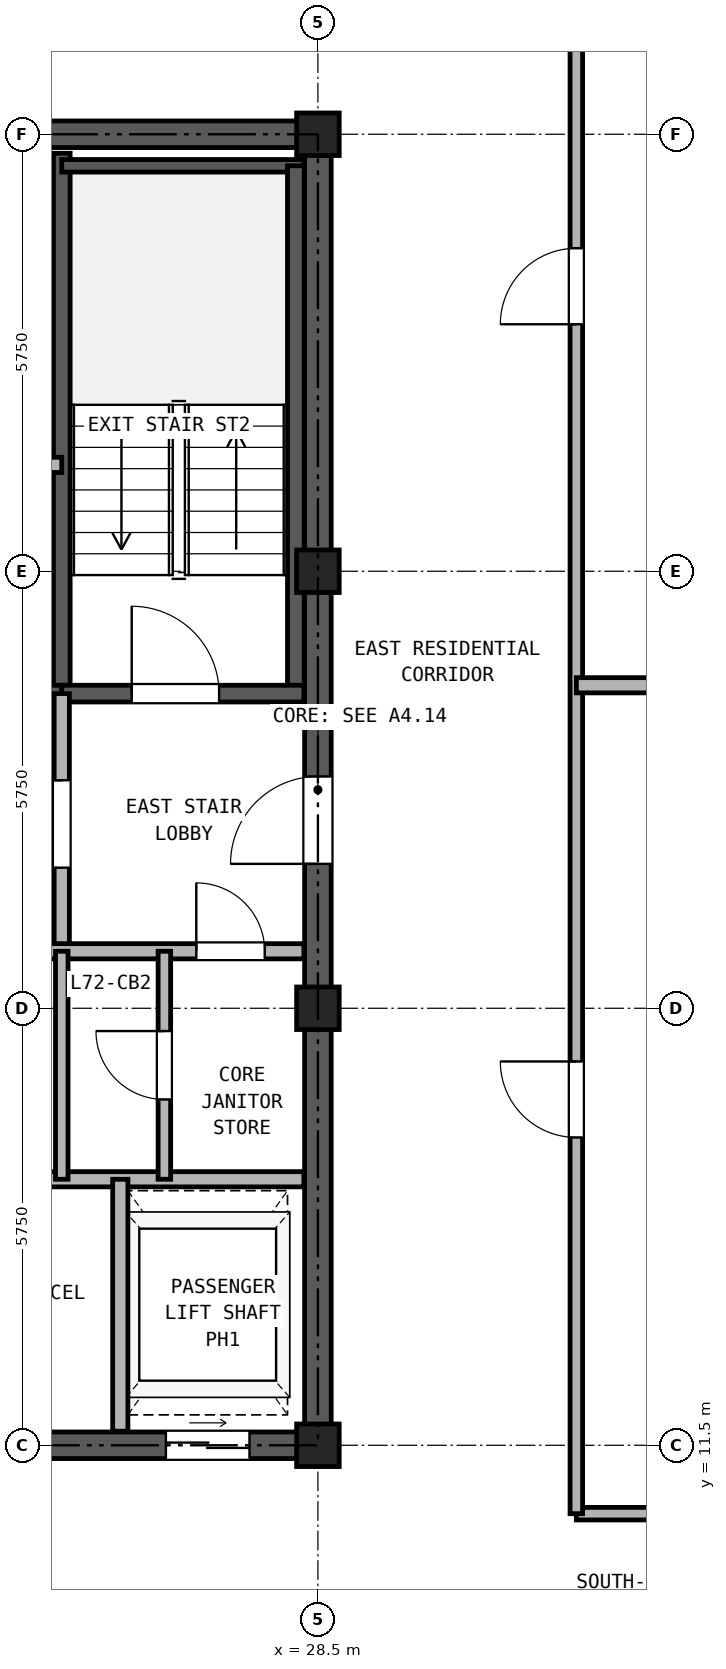
"""IFC4 building model, lengths in metres.
Left out: names, types, materials, properties, quantities, classifications, styles, units other than length and angle.
Written with IfcOpenShell. Run it as: python <this file> out.ifc"""

import sys

from ifc_helpers import new_model, si_unit, direction, frame, frame_2d, origin, origin_2d, place, context, subcontext, project, spatial, rectangle, hollow_rectangle, extrude, source, transform, mapped, element, fill, save


model = new_model("IFC4")
c1 = context("Model", 3, precision=1e-05, world=origin(), true_north=direction((0.0, 1.0)))
c2 = subcontext(c1, "Body", "Model", "MODEL_VIEW")
j1 = project(units=[si_unit("LENGTHUNIT", "METRE"), si_unit("PLANEANGLEUNIT", "RADIAN")], contexts=[c1])
p1 = place(None, origin())
s1 = spatial("IfcSite", under=j1, at=p1, CompositionType="ELEMENT")
p2 = place(p1, origin())
s2 = spatial("IfcBuilding", under=s1, at=p2, CompositionType="ELEMENT")
p3 = place(p2, frame((0.0, 0.0, 252.1)))
s3 = spatial("IfcBuildingStorey", under=s2, at=p3, CompositionType="ELEMENT", Elevation=252.1)
m1 = source(origin(), c2, "Body", "SweptSolid", [
    extrude(hollow_rectangle(XDim=0.56, YDim=0.56, WallThickness=0.03, at=origin_2d()), origin(), (0.0, 0.0, 1.0), 2.98),
])
for number, where, z_axis, x_axis in (
    (1, (28.5, 11.5, 0.0), (0.0, 0.0, 1.0), (1.0, 0.0, 0.0)),
    (2, (28.5, 17.25, 0.0), (0.0, 0.0, 1.0), (1.0, 0.0, 0.0)),
    (3, (28.5, 23.0, 0.0), (0.0, 0.0, 1.0), (1.0, 0.0, 0.0)),
    (4, (28.5, 28.75, 0.0), (0.0, 0.0, 1.0), (1.0, 0.0, 0.0)),
):
    element("IfcColumn", number, at=place(p3, frame(where, z_axis=z_axis, x_axis=x_axis)), inside=s3, PredefinedType="COLUMN", context=c2, shape_type="MappedRepresentation", body=[
        mapped(m1, transform((0.0, 0.0, 0.0), x_axis=(1.0, 0.0, 0.0), y_axis=(0.0, 1.0, 0.0), z_axis=(0.0, 0.0, 1.0), scale=1.0)),
    ])
p4 = place(p3, frame((18.325, 11.5, 0.0), z_axis=(0.0, 0.0, 1.0), x_axis=(1.0, 0.0, 0.0)))
e5 = element("IfcWall", 5, at=p4, inside=s3, PredefinedType="SHEAR", context=c2, shape_type="SweptSolid", body=[
    extrude(rectangle(XDim=10.35, YDim=0.35, at=frame_2d((5.175, 0.0))), origin(), (0.0, 0.0, 1.0), 2.98),
])
p5 = place(p4, frame((1.775, 0.0, 0.0)))
e6 = element("IfcOpeningElement", 6, at=p5, cuts=e5, PredefinedType="OPENING", context=c2, shape_type="SweptSolid", body=[
    extrude(rectangle(XDim=0.95, YDim=2.15, at=frame_2d((0.475, 1.075))), frame((0.0, 0.185, 0.0), z_axis=(0.0, -1.0, 0.0), x_axis=(1.0, 0.0, 0.0)), (0.0, 0.0, 1.0), 0.37),
])
p6 = place(p4, frame((5.275, 0.0, 0.0)))
e7 = element("IfcOpeningElement", 7, at=p6, cuts=e5, PredefinedType="OPENING", context=c2, shape_type="SweptSolid", body=[
    extrude(rectangle(XDim=0.95, YDim=2.15, at=frame_2d((0.475, 1.075))), frame((0.0, 0.185, 0.0), z_axis=(0.0, -1.0, 0.0), x_axis=(1.0, 0.0, 0.0)), (0.0, 0.0, 1.0), 0.37),
])
p7 = place(p4, frame((8.175, 0.0, 0.0)))
e8 = element("IfcOpeningElement", 8, at=p7, cuts=e5, PredefinedType="OPENING", context=c2, shape_type="SweptSolid", body=[
    extrude(rectangle(XDim=1.1, YDim=2.25, at=frame_2d((0.55, 1.125))), frame((0.0, 0.185, 0.0), z_axis=(0.0, -1.0, 0.0), x_axis=(1.0, 0.0, 0.0)), (0.0, 0.0, 1.0), 0.37),
])
p8 = place(p3, frame((18.325, 28.75, 0.0), z_axis=(0.0, 0.0, 1.0), x_axis=(1.0, 0.0, 0.0)))
e9 = element("IfcWall", 9, at=p8, inside=s3, PredefinedType="SHEAR", context=c2, shape_type="SweptSolid", body=[
    extrude(rectangle(XDim=10.35, YDim=0.35, at=frame_2d((5.175, 0.0))), origin(), (0.0, 0.0, 1.0), 2.98),
])
p9 = place(p8, frame((4.055, 0.0, 0.0)))
e10 = element("IfcOpeningElement", 10, at=p9, cuts=e9, PredefinedType="OPENING", context=c2, shape_type="SweptSolid", body=[
    extrude(rectangle(XDim=0.9, YDim=2.05, at=frame_2d((0.45, 1.025))), frame((0.0, 0.185, 0.0), z_axis=(0.0, -1.0, 0.0), x_axis=(1.0, 0.0, 0.0)), (0.0, 0.0, 1.0), 0.37),
])
p10 = place(p8, frame((5.595, 0.0, 0.0)))
e11 = element("IfcOpeningElement", 11, at=p10, cuts=e9, PredefinedType="OPENING", context=c2, shape_type="SweptSolid", body=[
    extrude(rectangle(XDim=0.9, YDim=2.05, at=frame_2d((0.45, 1.025))), frame((0.0, 0.185, 0.0), z_axis=(0.0, -1.0, 0.0), x_axis=(1.0, 0.0, 0.0)), (0.0, 0.0, 1.0), 0.37),
])
p11 = place(p3, frame((28.5, 11.675, 0.0), z_axis=(0.0, 0.0, 1.0), x_axis=(0.0, 1.0, 0.0)))
e12 = element("IfcWall", 12, at=p11, inside=s3, PredefinedType="SHEAR", context=c2, shape_type="SweptSolid", body=[
    extrude(rectangle(XDim=16.9, YDim=0.35, at=frame_2d((8.45, 0.0))), origin(), (0.0, 0.0, 1.0), 2.98),
])
p12 = place(p11, frame((7.475, 0.0, 0.0)))
e13 = element("IfcOpeningElement", 13, at=p12, cuts=e12, PredefinedType="OPENING", context=c2, shape_type="SweptSolid", body=[
    extrude(rectangle(XDim=1.15, YDim=2.2, at=frame_2d((0.575, 1.1))), frame((0.0, 0.185, 0.0), z_axis=(0.0, -1.0, 0.0), x_axis=(1.0, 0.0, 0.0)), (0.0, 0.0, 1.0), 0.37),
])
p13 = place(p3, frame((25.13, 21.39, 0.0), z_axis=(0.0, 0.0, 1.0), x_axis=(0.0, 1.0, 0.0)))
e14 = element("IfcWall", 14, at=p13, inside=s3, PredefinedType="SOLIDWALL", context=c2, shape_type="SweptSolid", body=[
    extrude(rectangle(XDim=7.11, YDim=0.22, at=frame_2d((3.555, 0.0))), origin(), (0.0, 0.0, 1.0), 2.98),
])
p14 = place(p3, frame((25.13, 28.335, 0.0), z_axis=(0.0, 0.0, 1.0), x_axis=(1.0, 0.0, 0.0)))
e15 = element("IfcWall", 15, at=p14, inside=s3, PredefinedType="PARTITIONING", context=c2, shape_type="SweptSolid", body=[
    extrude(rectangle(XDim=3.185, YDim=0.165, at=frame_2d((1.593, 0.0))), origin(), (0.0, 0.0, 1.0), 2.98),
])
p15 = place(p3, frame((28.21, 21.39, 0.0), z_axis=(0.0, 0.0, 1.0), x_axis=(0.0, 1.0, 0.0)))
e16 = element("IfcWall", 16, at=p15, inside=s3, PredefinedType="SOLIDWALL", context=c2, shape_type="SweptSolid", body=[
    extrude(rectangle(XDim=6.945, YDim=0.22, at=frame_2d((3.473, 0.0))), origin(), (0.0, 0.0, 1.0), 2.98),
])
p16 = place(p3, frame((18.685, 21.39, 0.0), z_axis=(0.0, 0.0, 1.0), x_axis=(1.0, 0.0, 0.0)))
e17 = element("IfcWall", 17, at=p16, inside=s3, PredefinedType="SOLIDWALL", context=c2, shape_type="SweptSolid", body=[
    extrude(rectangle(XDim=6.445, YDim=0.22, at=frame_2d((3.222, 0.0))), origin(), (0.0, 0.0, 1.0), 2.98),
])
p17 = place(p16, frame((1.165, 0.0, 0.0)))
e18 = element("IfcOpeningElement", 18, at=p17, cuts=e17, PredefinedType="OPENING", context=c2, shape_type="SweptSolid", body=[
    extrude(rectangle(XDim=1.15, YDim=2.2, at=frame_2d((0.575, 1.1))), frame((0.0, 0.12, 0.0), z_axis=(0.0, -1.0, 0.0), x_axis=(1.0, 0.0, 0.0)), (0.0, 0.0, 1.0), 0.24),
])
p18 = place(p16, frame((4.895, 0.0, 0.0)))
e19 = element("IfcOpeningElement", 19, at=p18, cuts=e17, PredefinedType="OPENING", context=c2, shape_type="SweptSolid", body=[
    extrude(rectangle(XDim=1.1, YDim=2.25, at=frame_2d((0.55, 1.125))), frame((0.0, 0.12, 0.0), z_axis=(0.0, -1.0, 0.0), x_axis=(1.0, 0.0, 0.0)), (0.0, 0.0, 1.0), 0.24),
])
p19 = place(p3, frame((25.13, 21.39, 0.0), z_axis=(0.0, 0.0, 1.0), x_axis=(1.0, 0.0, 0.0)))
e20 = element("IfcWall", 20, at=p19, inside=s3, PredefinedType="SOLIDWALL", context=c2, shape_type="SweptSolid", body=[
    extrude(rectangle(XDim=3.185, YDim=0.22, at=frame_2d((1.593, 0.0))), origin(), (0.0, 0.0, 1.0), 2.98),
])
p20 = place(p19, frame((0.92, 0.0, 0.0)))
e21 = element("IfcOpeningElement", 21, at=p20, cuts=e20, PredefinedType="OPENING", context=c2, shape_type="SweptSolid", body=[
    extrude(rectangle(XDim=1.15, YDim=2.2, at=frame_2d((0.575, 1.1))), frame((0.0, 0.12, 0.0), z_axis=(0.0, -1.0, 0.0), x_axis=(1.0, 0.0, 0.0)), (0.0, 0.0, 1.0), 0.24),
])
p21 = place(p3, frame((22.11, 24.4, 0.0), z_axis=(0.0, 0.0, 1.0), x_axis=(1.0, 0.0, 0.0)))
e22 = element("IfcWall", 22, at=p21, inside=s3, PredefinedType="PARTITIONING", context=c2, shape_type="SweptSolid", body=[
    extrude(rectangle(XDim=3.02, YDim=0.2, at=frame_2d((1.51, 0.0))), origin(), (0.0, 0.0, 1.0), 2.98),
])
p22 = place(p3, frame((25.13, 18.0, 0.0), z_axis=(0.0, 0.0, 1.0), x_axis=(0.0, 1.0, 0.0)))
e23 = element("IfcWall", 23, at=p22, inside=s3, PredefinedType="PARTITIONING", context=c2, shape_type="SweptSolid", body=[
    extrude(rectangle(XDim=3.39, YDim=0.2, at=frame_2d((1.695, 0.0))), origin(), (0.0, 0.0, 1.0), 2.98),
])
p23 = place(p22, frame((1.1, 0.0, 0.0)))
e24 = element("IfcOpeningElement", 24, at=p23, cuts=e23, PredefinedType="OPENING", context=c2, shape_type="SweptSolid", body=[
    extrude(rectangle(XDim=1.15, YDim=2.2, at=frame_2d((0.575, 1.1))), frame((0.0, 0.11, 0.0), z_axis=(0.0, -1.0, 0.0), x_axis=(1.0, 0.0, 0.0)), (0.0, 0.0, 1.0), 0.22),
])
p24 = place(p3, frame((18.685, 18.0, 0.0), z_axis=(0.0, 0.0, 1.0), x_axis=(1.0, 0.0, 0.0)))
e25 = element("IfcWall", 25, at=p24, inside=s3, PredefinedType="PARTITIONING", context=c2, shape_type="SweptSolid", body=[
    extrude(rectangle(XDim=9.63, YDim=0.2, at=frame_2d((4.815, 0.0))), origin(), (0.0, 0.0, 1.0), 2.98),
])
p25 = place(p24, frame((0.565, 0.0, 0.0)))
e26 = element("IfcOpeningElement", 26, at=p25, cuts=e25, PredefinedType="OPENING", context=c2, shape_type="SweptSolid", body=[
    extrude(rectangle(XDim=1.3, YDim=2.3, at=frame_2d((0.65, 1.15))), frame((0.0, 0.11, 0.0), z_axis=(0.0, -1.0, 0.0), x_axis=(1.0, 0.0, 0.0)), (0.0, 0.0, 1.0), 0.22),
])
p26 = place(p24, frame((2.665, 0.0, 0.0)))
e27 = element("IfcOpeningElement", 27, at=p26, cuts=e25, PredefinedType="OPENING", context=c2, shape_type="SweptSolid", body=[
    extrude(rectangle(XDim=1.3, YDim=2.3, at=frame_2d((0.65, 1.15))), frame((0.0, 0.11, 0.0), z_axis=(0.0, -1.0, 0.0), x_axis=(1.0, 0.0, 0.0)), (0.0, 0.0, 1.0), 0.22),
])
p27 = place(p24, frame((5.085, 0.0, 0.0)))
e28 = element("IfcOpeningElement", 28, at=p27, cuts=e25, PredefinedType="OPENING", context=c2, shape_type="SweptSolid", body=[
    extrude(rectangle(XDim=0.9, YDim=2.05, at=frame_2d((0.45, 1.025))), frame((0.0, 0.11, 0.0), z_axis=(0.0, -1.0, 0.0), x_axis=(1.0, 0.0, 0.0)), (0.0, 0.0, 1.0), 0.22),
])
p28 = place(p24, frame((8.215, 0.0, 0.0)))
e29 = element("IfcOpeningElement", 29, at=p28, cuts=e25, PredefinedType="OPENING", context=c2, shape_type="SweptSolid", body=[
    extrude(rectangle(XDim=0.9, YDim=2.05, at=frame_2d((0.45, 1.025))), frame((0.0, 0.11, 0.0), z_axis=(0.0, -1.0, 0.0), x_axis=(1.0, 0.0, 0.0)), (0.0, 0.0, 1.0), 0.22),
])
p29 = place(p3, frame((18.685, 15.0, 0.0), z_axis=(0.0, 0.0, 1.0), x_axis=(1.0, 0.0, 0.0)))
e30 = element("IfcWall", 30, at=p29, inside=s3, PredefinedType="PARTITIONING", context=c2, shape_type="SweptSolid", body=[
    extrude(rectangle(XDim=9.63, YDim=0.2, at=frame_2d((4.815, 0.0))), origin(), (0.0, 0.0, 1.0), 2.98),
])
p30 = place(p3, frame((25.13, 15.0, 0.0), z_axis=(0.0, 0.0, 1.0), x_axis=(0.0, 1.0, 0.0)))
e31 = element("IfcWall", 31, at=p30, inside=s3, PredefinedType="PARTITIONING", context=c2, shape_type="SweptSolid", body=[
    extrude(rectangle(XDim=3.0, YDim=0.165, at=frame_2d((1.5, 0.0))), origin(), (0.0, 0.0, 1.0), 2.98),
])
p31 = place(p3, frame((26.48, 15.0, 0.0), z_axis=(0.0, 0.0, 1.0), x_axis=(0.0, 1.0, 0.0)))
e32 = element("IfcWall", 32, at=p31, inside=s3, PredefinedType="PARTITIONING", context=c2, shape_type="SweptSolid", body=[
    extrude(rectangle(XDim=3.0, YDim=0.165, at=frame_2d((1.5, 0.0))), origin(), (0.0, 0.0, 1.0), 2.98),
])
p32 = place(p31, frame((1.05, 0.0, 0.0)))
e33 = element("IfcOpeningElement", 33, at=p32, cuts=e32, PredefinedType="OPENING", context=c2, shape_type="SweptSolid", body=[
    extrude(rectangle(XDim=0.9, YDim=2.05, at=frame_2d((0.45, 1.025))), frame((0.0, 0.093, 0.0), z_axis=(0.0, -1.0, 0.0), x_axis=(1.0, 0.0, 0.0)), (0.0, 0.0, 1.0), 0.185),
])
p33 = place(p3, frame((25.9, 11.685, 0.0), z_axis=(0.0, 0.0, 1.0), x_axis=(0.0, 1.0, 0.0)))
e34 = element("IfcWall", 34, at=p33, inside=s3, PredefinedType="PARTITIONING", context=c2, shape_type="SweptSolid", body=[
    extrude(rectangle(XDim=3.315, YDim=0.2, at=frame_2d((1.657, 0.0))), origin(), (0.0, 0.0, 1.0), 2.98),
])
p34 = place(p3, frame((31.9, 10.6, 0.0), z_axis=(0.0, 0.0, 1.0), x_axis=(1.0, 0.0, 0.0)))
e35 = element("IfcWall", 35, at=p34, inside=s3, PredefinedType="PARTITIONING", context=c2, shape_type="SweptSolid", body=[
    extrude(rectangle(XDim=6.3, YDim=0.165, at=frame_2d((3.15, 0.0))), origin(), (0.0, 0.0, 1.0), 2.98),
])
p35 = place(p3, frame((31.9, 10.6, 0.0), z_axis=(0.0, 0.0, 1.0), x_axis=(0.0, 1.0, 0.0)))
e36 = element("IfcWall", 36, at=p35, inside=s3, PredefinedType="PARTITIONING", context=c2, shape_type="SweptSolid", body=[
    extrude(rectangle(XDim=24.54, YDim=0.165, at=frame_2d((12.27, 0.0))), origin(), (0.0, 0.0, 1.0), 2.98),
])
p36 = place(p35, frame((4.95, 0.0, 0.0)))
e37 = element("IfcOpeningElement", 37, at=p36, cuts=e36, PredefinedType="OPENING", context=c2, shape_type="SweptSolid", body=[
    extrude(rectangle(XDim=1.0, YDim=2.15, at=frame_2d((0.5, 1.075))), frame((0.0, 0.093, 0.0), z_axis=(0.0, -1.0, 0.0), x_axis=(1.0, 0.0, 0.0)), (0.0, 0.0, 1.0), 0.185),
])
p37 = place(p35, frame((15.65, 0.0, 0.0)))
e38 = element("IfcOpeningElement", 38, at=p37, cuts=e36, PredefinedType="OPENING", context=c2, shape_type="SweptSolid", body=[
    extrude(rectangle(XDim=1.0, YDim=2.15, at=frame_2d((0.5, 1.075))), frame((0.0, 0.093, 0.0), z_axis=(0.0, -1.0, 0.0), x_axis=(1.0, 0.0, 0.0)), (0.0, 0.0, 1.0), 0.185),
])
p38 = place(p3, frame((31.9, 21.5, 0.0), z_axis=(0.0, 0.0, 1.0), x_axis=(1.0, 0.0, 0.0)))
e39 = element("IfcWall", 39, at=p38, inside=s3, PredefinedType="PARTITIONING", context=c2, shape_type="SweptSolid", body=[
    extrude(rectangle(XDim=9.74, YDim=0.2, at=frame_2d((4.87, 0.0))), origin(), (0.0, 0.0, 1.0), 2.98),
])
p39 = place(p20, frame((1.15, 0.0, 0.0), z_axis=(0.0, 0.0, 1.0), x_axis=(-1.0, 0.0, 0.0)))
e40 = element("IfcDoor", 40, at=p39, inside=s3, OperationType="SINGLE_SWING_LEFT", PredefinedType="DOOR", context=c2, shape_type="SweptSolid", body=[
    extrude(rectangle(XDim=1.15, YDim=2.2, at=frame_2d((0.575, 1.1))), frame((0.0, 0.025, 0.0), z_axis=(0.0, -1.0, 0.0), x_axis=(1.0, 0.0, 0.0)), (0.0, 0.0, 1.0), 0.05),
])
fill(e21, e40)
p40 = place(p23, origin())
e41 = element("IfcDoor", 41, at=p40, inside=s3, OperationType="SINGLE_SWING_RIGHT", PredefinedType="DOOR", context=c2, shape_type="SweptSolid", body=[
    extrude(rectangle(XDim=1.15, YDim=2.2, at=frame_2d((0.575, 1.1))), frame((0.0, 0.025, 0.0), z_axis=(0.0, -1.0, 0.0), x_axis=(1.0, 0.0, 0.0)), (0.0, 0.0, 1.0), 0.05),
])
fill(e24, e41)
p41 = place(p32, origin())
e42 = element("IfcDoor", 42, at=p41, inside=s3, OperationType="SINGLE_SWING_RIGHT", PredefinedType="DOOR", context=c2, shape_type="SweptSolid", body=[
    extrude(rectangle(XDim=0.9, YDim=2.05, at=frame_2d((0.45, 1.025))), frame((0.0, 0.025, 0.0), z_axis=(0.0, -1.0, 0.0), x_axis=(1.0, 0.0, 0.0)), (0.0, 0.0, 1.0), 0.05),
])
fill(e33, e42)
p42 = place(p28, frame((0.9, 0.0, 0.0), z_axis=(0.0, 0.0, 1.0), x_axis=(-1.0, 0.0, 0.0)))
e43 = element("IfcDoor", 43, at=p42, inside=s3, OperationType="SINGLE_SWING_LEFT", PredefinedType="DOOR", context=c2, shape_type="SweptSolid", body=[
    extrude(rectangle(XDim=0.9, YDim=2.05, at=frame_2d((0.45, 1.025))), frame((0.0, 0.025, 0.0), z_axis=(0.0, -1.0, 0.0), x_axis=(1.0, 0.0, 0.0)), (0.0, 0.0, 1.0), 0.05),
])
fill(e29, e43)
p43 = place(p12, origin())
e44 = element("IfcDoor", 44, at=p43, inside=s3, OperationType="SINGLE_SWING_LEFT", PredefinedType="DOOR", context=c2, shape_type="SweptSolid", body=[
    extrude(rectangle(XDim=1.15, YDim=2.2, at=frame_2d((0.575, 1.1))), frame((0.0, 0.025, 0.0), z_axis=(0.0, -1.0, 0.0), x_axis=(1.0, 0.0, 0.0)), (0.0, 0.0, 1.0), 0.05),
])
fill(e13, e44)
p44 = place(p7, frame((1.1, 0.0, 0.0), z_axis=(0.0, 0.0, 1.0), x_axis=(-1.0, 0.0, 0.0)))
e45 = element("IfcDoor", 45, at=p44, inside=s3, OperationType="DOUBLE_DOOR_SLIDING", PredefinedType="DOOR", context=c2, shape_type="SweptSolid", body=[
    extrude(rectangle(XDim=1.1, YDim=2.25, at=frame_2d((0.55, 1.125))), frame((0.0, 0.025, 0.0), z_axis=(0.0, -1.0, 0.0), x_axis=(1.0, 0.0, 0.0)), (0.0, 0.0, 1.0), 0.05),
])
fill(e8, e45)
p45 = place(p36, frame((1.0, 0.0, 0.0), z_axis=(0.0, 0.0, 1.0), x_axis=(-1.0, 0.0, 0.0)))
e46 = element("IfcDoor", 46, at=p45, inside=s3, OperationType="SINGLE_SWING_RIGHT", PredefinedType="DOOR", context=c2, shape_type="SweptSolid", body=[
    extrude(rectangle(XDim=1.0, YDim=2.15, at=frame_2d((0.5, 1.075))), frame((0.0, 0.025, 0.0), z_axis=(0.0, -1.0, 0.0), x_axis=(1.0, 0.0, 0.0)), (0.0, 0.0, 1.0), 0.05),
])
fill(e37, e46)
p46 = place(p37, frame((1.0, 0.0, 0.0), z_axis=(0.0, 0.0, 1.0), x_axis=(-1.0, 0.0, 0.0)))
e47 = element("IfcDoor", 47, at=p46, inside=s3, OperationType="SINGLE_SWING_LEFT", PredefinedType="DOOR", context=c2, shape_type="SweptSolid", body=[
    extrude(rectangle(XDim=1.0, YDim=2.15, at=frame_2d((0.5, 1.075))), frame((0.0, 0.025, 0.0), z_axis=(0.0, -1.0, 0.0), x_axis=(1.0, 0.0, 0.0)), (0.0, 0.0, 1.0), 0.05),
])
fill(e38, e47)
save(model, sys.argv[1])
